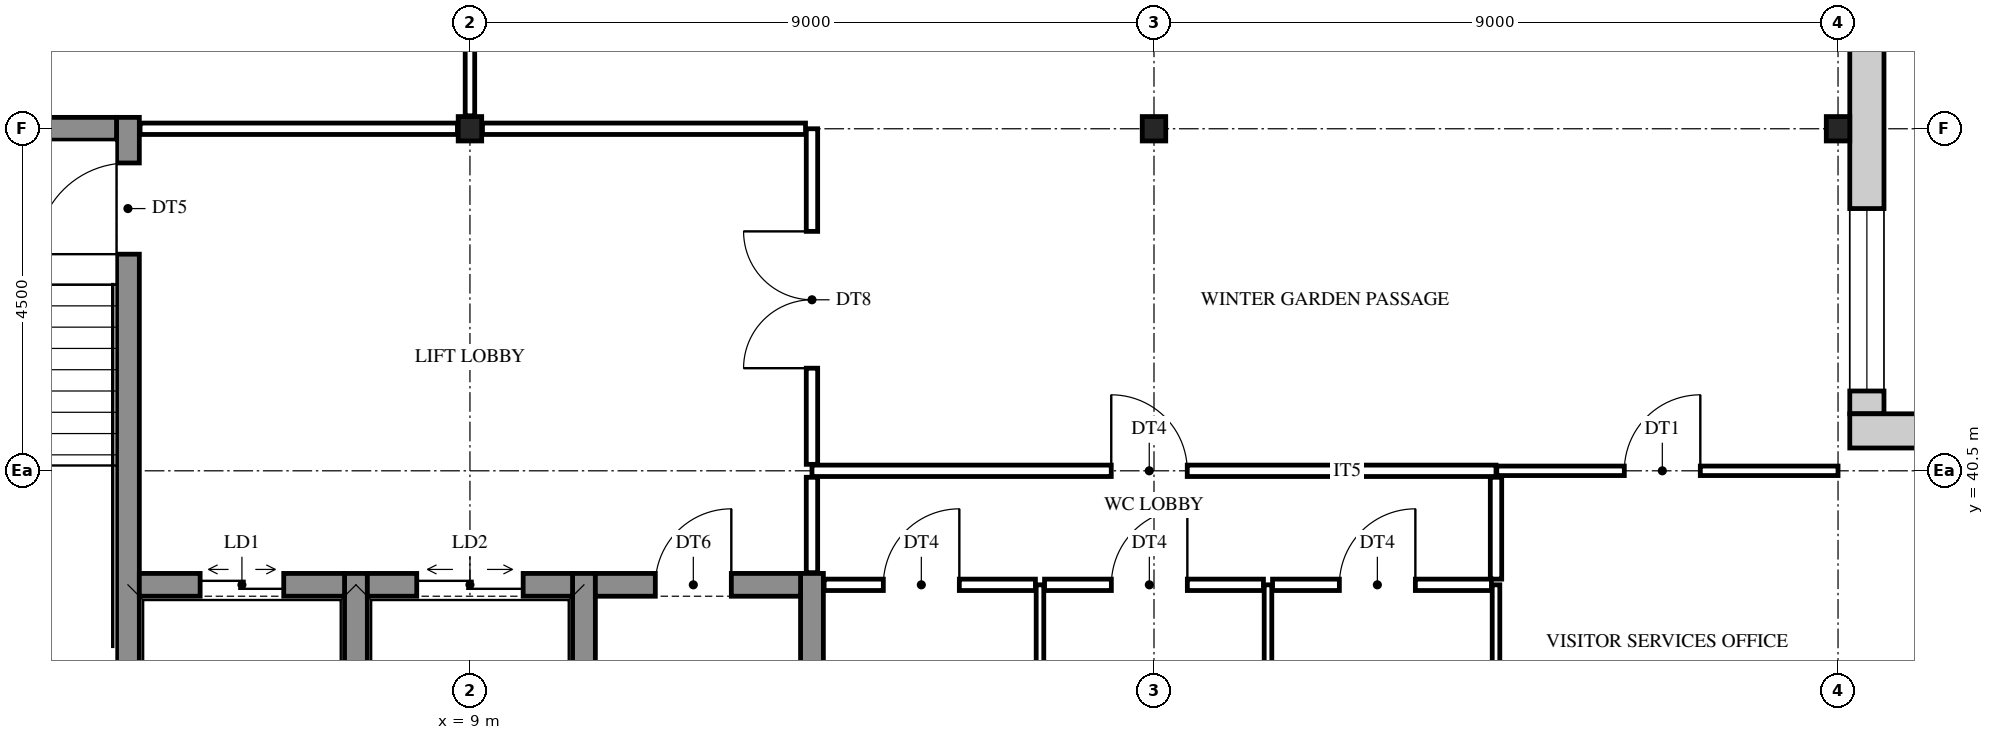
"""IFC4 building model, lengths in metres.
Left out: names, types, materials, properties, quantities, classifications, styles, units other than length and angle.
Written with IfcOpenShell. Run it as: python <this file> out.ifc"""

import sys

from ifc_helpers import new_model, si_unit, direction, frame, frame_2d, origin, origin_2d, place, context, subcontext, project, spatial, rectangle, i_section, extrude, element, fill, save


model = new_model("IFC4")
c1 = context("Model", 3, precision=1e-05, world=origin(), true_north=direction((0.0, 1.0)))
c2 = subcontext(c1, "Body", "Model", "MODEL_VIEW")
j1 = project(units=[si_unit("LENGTHUNIT", "METRE"), si_unit("PLANEANGLEUNIT", "RADIAN")], contexts=[c1])
p1 = place(None, origin())
s1 = spatial("IfcSite", under=j1, at=p1, CompositionType="ELEMENT")
p2 = place(p1, origin())
s2 = spatial("IfcBuilding", under=s1, at=p2, CompositionType="ELEMENT")
p3 = place(p2, origin())
s3 = spatial("IfcBuildingStorey", under=s2, at=p3, CompositionType="ELEMENT", Elevation=0.0)
for number, where, z_axis, x_axis in (
    (1, (9.0, 45.0, 0.0), (0.0, 0.0, 1.0), (1.0, 0.0, 0.0)),
    (2, (18.0, 45.0, 0.0), (0.0, 0.0, 1.0), (1.0, 0.0, 0.0)),
    (3, (27.0, 45.0, 0.0), (0.0, 0.0, 1.0), (1.0, 0.0, 0.0)),
):
    element("IfcColumn", number, at=place(p3, frame(where, z_axis=z_axis, x_axis=x_axis)), inside=s3, PredefinedType="COLUMN", context=c2, shape_type="SweptSolid", body=[
        extrude(i_section(OverallWidth=0.309, OverallDepth=0.321, WebThickness=0.014, FlangeThickness=0.022, FilletRadius=0.017, at=origin_2d()), origin(), (0.0, 0.0, 1.0), 6.0),
    ])
p4 = place(p3, frame((4.5, 35.85, 0.0), z_axis=(0.0, 0.0, 1.0), x_axis=(0.0, 1.0, 0.0)))
e4 = element("IfcWall", 4, at=p4, inside=s3, PredefinedType="SHEAR", context=c2, shape_type="SweptSolid", body=[
    extrude(rectangle(XDim=9.3, YDim=0.3, at=frame_2d((4.65, 0.0))), origin(), (0.0, 0.0, 1.0), 6.0),
])
p5 = place(p4, frame((7.5, 0.0, 0.0)))
e5 = element("IfcOpeningElement", 5, at=p5, cuts=e4, PredefinedType="OPENING", context=c2, shape_type="SweptSolid", body=[
    extrude(rectangle(XDim=1.2, YDim=2.1, at=frame_2d((0.6, 1.05))), frame((0.0, 0.16, 0.0), z_axis=(0.0, -1.0, 0.0), x_axis=(1.0, 0.0, 0.0)), (0.0, 0.0, 1.0), 0.32),
])
for number, where, z_axis, x_axis in (
    (6, (7.5, 35.85, 0.0), (0.0, 0.0, 1.0), (0.0, 1.0, 0.0)),
    (7, (10.5, 35.85, 0.0), (0.0, 0.0, 1.0), (0.0, 1.0, 0.0)),
    (8, (13.5, 35.85, 0.0), (0.0, 0.0, 1.0), (0.0, 1.0, 0.0)),
):
    element("IfcWall", number, at=place(p3, frame(where, z_axis=z_axis, x_axis=x_axis)), inside=s3, PredefinedType="SHEAR", context=c2, shape_type="SweptSolid", body=[
        extrude(rectangle(XDim=3.3, YDim=0.3, at=frame_2d((1.65, 0.0))), origin(), (0.0, 0.0, 1.0), 6.0),
    ])
p6 = place(p3, frame((4.65, 39.0, 0.0), z_axis=(0.0, 0.0, 1.0), x_axis=(1.0, 0.0, 0.0)))
e9 = element("IfcWall", 9, at=p6, inside=s3, PredefinedType="SHEAR", context=c2, shape_type="SweptSolid", body=[
    extrude(rectangle(XDim=2.7, YDim=0.3, at=frame_2d((1.35, 0.0))), origin(), (0.0, 0.0, 1.0), 6.0),
])
p7 = place(p6, frame((0.8, 0.0, 0.0)))
e10 = element("IfcOpeningElement", 10, at=p7, cuts=e9, PredefinedType="OPENING", context=c2, shape_type="SweptSolid", body=[
    extrude(rectangle(XDim=1.1, YDim=2.1, at=frame_2d((0.55, 1.05))), frame((0.0, 0.16, 0.0), z_axis=(0.0, -1.0, 0.0), x_axis=(1.0, 0.0, 0.0)), (0.0, 0.0, 1.0), 0.32),
])
p8 = place(p3, frame((7.65, 39.0, 0.0), z_axis=(0.0, 0.0, 1.0), x_axis=(1.0, 0.0, 0.0)))
e11 = element("IfcWall", 11, at=p8, inside=s3, PredefinedType="SHEAR", context=c2, shape_type="SweptSolid", body=[
    extrude(rectangle(XDim=2.7, YDim=0.3, at=frame_2d((1.35, 0.0))), origin(), (0.0, 0.0, 1.0), 6.0),
])
p9 = place(p8, frame((0.65, 0.0, 0.0)))
e12 = element("IfcOpeningElement", 12, at=p9, cuts=e11, PredefinedType="OPENING", context=c2, shape_type="SweptSolid", body=[
    extrude(rectangle(XDim=1.4, YDim=2.1, at=frame_2d((0.7, 1.05))), frame((0.0, 0.16, 0.0), z_axis=(0.0, -1.0, 0.0), x_axis=(1.0, 0.0, 0.0)), (0.0, 0.0, 1.0), 0.32),
])
p10 = place(p3, frame((10.65, 39.0, 0.0), z_axis=(0.0, 0.0, 1.0), x_axis=(1.0, 0.0, 0.0)))
e13 = element("IfcWall", 13, at=p10, inside=s3, PredefinedType="SHEAR", context=c2, shape_type="SweptSolid", body=[
    extrude(rectangle(XDim=2.7, YDim=0.3, at=frame_2d((1.35, 0.0))), origin(), (0.0, 0.0, 1.0), 6.0),
])
p11 = place(p10, frame((0.789, 0.0, 0.0)))
e14 = element("IfcOpeningElement", 14, at=p11, cuts=e13, PredefinedType="OPENING", context=c2, shape_type="SweptSolid", body=[
    extrude(rectangle(XDim=1.0, YDim=2.1, at=frame_2d((0.5, 1.05))), frame((0.0, 0.16, 0.0), z_axis=(0.0, -1.0, 0.0), x_axis=(1.0, 0.0, 0.0)), (0.0, 0.0, 1.0), 0.32),
])
p12 = place(p3, frame((0.15, 45.0, 0.0), z_axis=(0.0, 0.0, 1.0), x_axis=(1.0, 0.0, 0.0)))
e15 = element("IfcWall", 15, at=p12, inside=s3, PredefinedType="SHEAR", context=c2, shape_type="SweptSolid", body=[
    extrude(rectangle(XDim=4.2, YDim=0.3, at=frame_2d((2.1, 0.0))), origin(), (0.0, 0.0, 1.0), 6.0),
])
p13 = place(p3, frame((27.379, 72.155, 0.0), z_axis=(0.0, 0.0, 1.0), x_axis=(0.0, -1.0, 0.0)))
e16 = element("IfcWall", 16, at=p13, inside=s3, PredefinedType="STANDARD", context=c2, shape_type="SweptSolid", body=[
    extrude(rectangle(XDim=30.905, YDim=0.45, at=frame_2d((15.452, 0.0))), origin(), (0.0, 0.0, 1.0), 6.0),
])
p14 = place(p13, frame((19.054, 0.0, 0.012)))
e17 = element("IfcOpeningElement", 17, at=p14, cuts=e16, PredefinedType="OPENING", context=c2, shape_type="SweptSolid", body=[
    extrude(rectangle(XDim=3.6, YDim=2.7, at=frame_2d((1.8, 1.35))), frame((0.0, 0.235, 0.0), z_axis=(0.0, -1.0, 0.0), x_axis=(1.0, 0.0, 0.0)), (0.0, 0.0, 1.0), 0.47),
])
p15 = place(p13, frame((28.205, 0.0, 0.9)))
e18 = element("IfcOpeningElement", 18, at=p15, cuts=e16, PredefinedType="OPENING", context=c2, shape_type="SweptSolid", body=[
    extrude(rectangle(XDim=2.4, YDim=3.5, at=frame_2d((1.2, 1.75))), frame((0.0, 0.235, 0.0), z_axis=(0.0, -1.0, 0.0), x_axis=(1.0, 0.0, 0.0)), (0.0, 0.0, 1.0), 0.47),
])
p16 = place(p13, frame((23.705, 0.0, 0.9)))
e19 = element("IfcOpeningElement", 19, at=p16, cuts=e16, PredefinedType="OPENING", context=c2, shape_type="SweptSolid", body=[
    extrude(rectangle(XDim=2.4, YDim=3.5, at=frame_2d((1.2, 1.75))), frame((0.0, 0.235, 0.0), z_axis=(0.0, -1.0, 0.0), x_axis=(1.0, 0.0, 0.0)), (0.0, 0.0, 1.0), 0.47),
])
p17 = place(p13, frame((14.705, 0.0, 0.9)))
e20 = element("IfcOpeningElement", 20, at=p17, cuts=e16, PredefinedType="OPENING", context=c2, shape_type="SweptSolid", body=[
    extrude(rectangle(XDim=2.4, YDim=3.5, at=frame_2d((1.2, 1.75))), frame((0.0, 0.235, 0.0), z_axis=(0.0, -1.0, 0.0), x_axis=(1.0, 0.0, 0.0)), (0.0, 0.0, 1.0), 0.47),
])
p18 = place(p13, frame((10.205, 0.0, 0.9)))
e21 = element("IfcOpeningElement", 21, at=p18, cuts=e16, PredefinedType="OPENING", context=c2, shape_type="SweptSolid", body=[
    extrude(rectangle(XDim=2.4, YDim=3.5, at=frame_2d((1.2, 1.75))), frame((0.0, 0.235, 0.0), z_axis=(0.0, -1.0, 0.0), x_axis=(1.0, 0.0, 0.0)), (0.0, 0.0, 1.0), 0.47),
])
p19 = place(p3, frame((27.155, 41.025, 0.0), z_axis=(0.0, 0.0, 1.0), x_axis=(1.0, 0.0, 0.0)))
e22 = element("IfcWall", 22, at=p19, inside=s3, PredefinedType="STANDARD", context=c2, shape_type="SweptSolid", body=[
    extrude(rectangle(XDim=5.095, YDim=0.45, at=frame_2d((2.548, 0.0))), origin(), (0.0, 0.0, 1.0), 6.0),
])
p20 = place(p3, frame((9.0, 45.17, 0.0), z_axis=(0.0, 0.0, 1.0), x_axis=(0.0, 1.0, 0.0)))
e23 = element("IfcWall", 23, at=p20, inside=s3, PredefinedType="PARTITIONING", context=c2, shape_type="SweptSolid", body=[
    extrude(rectangle(XDim=8.659, YDim=0.125, at=frame_2d((4.33, 0.0))), origin(), (0.0, 0.0, 1.0), 5.218),
])
p21 = place(p20, frame((3.429, 0.0, 0.0)))
e24 = element("IfcOpeningElement", 24, at=p21, cuts=e23, PredefinedType="OPENING", context=c2, shape_type="SweptSolid", body=[
    extrude(rectangle(XDim=1.8, YDim=2.1, at=frame_2d((0.9, 1.05))), frame((0.0, 0.073, 0.0), z_axis=(0.0, -1.0, 0.0), x_axis=(1.0, 0.0, 0.0)), (0.0, 0.0, 1.0), 0.145),
])
p22 = place(p3, frame((13.5, 39.16, 0.0), z_axis=(0.0, 0.0, 1.0), x_axis=(0.0, 1.0, 0.0)))
e25 = element("IfcWall", 25, at=p22, inside=s3, PredefinedType="PARTITIONING", context=c2, shape_type="SweptSolid", body=[
    extrude(rectangle(XDim=1.255, YDim=0.15, at=frame_2d((0.627, 0.0))), origin(), (0.0, 0.0, 1.0), 5.218),
])
p23 = place(p3, frame((13.5, 40.585, 0.0), z_axis=(0.0, 0.0, 1.0), x_axis=(0.0, 1.0, 0.0)))
e26 = element("IfcWall", 26, at=p23, inside=s3, PredefinedType="PARTITIONING", context=c2, shape_type="SweptSolid", body=[
    extrude(rectangle(XDim=4.415, YDim=0.15, at=frame_2d((2.208, 0.0))), origin(), (0.0, 0.0, 1.0), 5.218),
])
p24 = place(p23, frame((1.265, 0.0, 0.0)))
e27 = element("IfcOpeningElement", 27, at=p24, cuts=e26, PredefinedType="OPENING", context=c2, shape_type="SweptSolid", body=[
    extrude(rectangle(XDim=1.8, YDim=2.1, at=frame_2d((0.9, 1.05))), frame((0.0, 0.085, 0.0), z_axis=(0.0, -1.0, 0.0), x_axis=(1.0, 0.0, 0.0)), (0.0, 0.0, 1.0), 0.17),
])
for number, where, z_axis, x_axis in (
    (28, (16.5, 35.85, 0.0), (0.0, 0.0, 1.0), (0.0, 1.0, 0.0)),
    (29, (19.5, 35.85, 0.0), (0.0, 0.0, 1.0), (0.0, 1.0, 0.0)),
    (30, (22.5, 35.85, 0.0), (0.0, 0.0, 1.0), (0.0, 1.0, 0.0)),
):
    element("IfcWall", number, at=place(p3, frame(where, z_axis=z_axis, x_axis=x_axis)), inside=s3, PredefinedType="PARTITIONING", context=c2, shape_type="SweptSolid", body=[
        extrude(rectangle(XDim=3.15, YDim=0.1, at=frame_2d((1.575, 0.0))), origin(), (0.0, 0.0, 1.0), 5.218),
    ])
p25 = place(p3, frame((22.5, 39.075, 0.0), z_axis=(0.0, 0.0, 1.0), x_axis=(0.0, 1.0, 0.0)))
e31 = element("IfcWall", 31, at=p25, inside=s3, PredefinedType="PARTITIONING", context=c2, shape_type="SweptSolid", body=[
    extrude(rectangle(XDim=1.34, YDim=0.15, at=frame_2d((0.67, 0.0))), origin(), (0.0, 0.0, 1.0), 5.218),
])
p26 = place(p3, frame((13.66, 39.0, 0.0), z_axis=(0.0, 0.0, 1.0), x_axis=(1.0, 0.0, 0.0)))
e32 = element("IfcWall", 32, at=p26, inside=s3, PredefinedType="PARTITIONING", context=c2, shape_type="SweptSolid", body=[
    extrude(rectangle(XDim=2.78, YDim=0.15, at=frame_2d((1.39, 0.0))), origin(), (0.0, 0.0, 1.0), 5.218),
])
p27 = place(p26, frame((0.779, 0.0, 0.0)))
e33 = element("IfcOpeningElement", 33, at=p27, cuts=e32, PredefinedType="OPENING", context=c2, shape_type="SweptSolid", body=[
    extrude(rectangle(XDim=1.0, YDim=2.1, at=frame_2d((0.5, 1.05))), frame((0.0, 0.085, 0.0), z_axis=(0.0, -1.0, 0.0), x_axis=(1.0, 0.0, 0.0)), (0.0, 0.0, 1.0), 0.17),
])
p28 = place(p3, frame((16.56, 39.0, 0.0), z_axis=(0.0, 0.0, 1.0), x_axis=(1.0, 0.0, 0.0)))
e34 = element("IfcWall", 34, at=p28, inside=s3, PredefinedType="PARTITIONING", context=c2, shape_type="SweptSolid", body=[
    extrude(rectangle(XDim=2.88, YDim=0.15, at=frame_2d((1.44, 0.0))), origin(), (0.0, 0.0, 1.0), 5.218),
])
p29 = place(p28, frame((0.879, 0.0, 0.0)))
e35 = element("IfcOpeningElement", 35, at=p29, cuts=e34, PredefinedType="OPENING", context=c2, shape_type="SweptSolid", body=[
    extrude(rectangle(XDim=1.0, YDim=2.1, at=frame_2d((0.5, 1.05))), frame((0.0, 0.085, 0.0), z_axis=(0.0, -1.0, 0.0), x_axis=(1.0, 0.0, 0.0)), (0.0, 0.0, 1.0), 0.17),
])
p30 = place(p3, frame((19.56, 39.0, 0.0), z_axis=(0.0, 0.0, 1.0), x_axis=(1.0, 0.0, 0.0)))
e36 = element("IfcWall", 36, at=p30, inside=s3, PredefinedType="PARTITIONING", context=c2, shape_type="SweptSolid", body=[
    extrude(rectangle(XDim=2.88, YDim=0.15, at=frame_2d((1.44, 0.0))), origin(), (0.0, 0.0, 1.0), 5.218),
])
p31 = place(p30, frame((0.879, 0.0, 0.0)))
e37 = element("IfcOpeningElement", 37, at=p31, cuts=e36, PredefinedType="OPENING", context=c2, shape_type="SweptSolid", body=[
    extrude(rectangle(XDim=1.0, YDim=2.1, at=frame_2d((0.5, 1.05))), frame((0.0, 0.085, 0.0), z_axis=(0.0, -1.0, 0.0), x_axis=(1.0, 0.0, 0.0)), (0.0, 0.0, 1.0), 0.17),
])
p32 = place(p3, frame((13.5, 40.5, 0.0), z_axis=(0.0, 0.0, 1.0), x_axis=(1.0, 0.0, 0.0)))
e38 = element("IfcWall", 38, at=p32, inside=s3, PredefinedType="PARTITIONING", context=c2, shape_type="SweptSolid", body=[
    extrude(rectangle(XDim=9.0, YDim=0.15, at=frame_2d((4.5, 0.0))), origin(), (0.0, 0.0, 1.0), 5.218),
])
p33 = place(p32, frame((3.938, 0.0, 0.0)))
e39 = element("IfcOpeningElement", 39, at=p33, cuts=e38, PredefinedType="OPENING", context=c2, shape_type="SweptSolid", body=[
    extrude(rectangle(XDim=1.0, YDim=2.1, at=frame_2d((0.5, 1.05))), frame((0.0, 0.085, 0.0), z_axis=(0.0, -1.0, 0.0), x_axis=(1.0, 0.0, 0.0)), (0.0, 0.0, 1.0), 0.17),
])
p34 = place(p3, frame((22.51, 40.5, 0.0), z_axis=(0.0, 0.0, 1.0), x_axis=(1.0, 0.0, 0.0)))
e40 = element("IfcWall", 40, at=p34, inside=s3, PredefinedType="PARTITIONING", context=c2, shape_type="SweptSolid", body=[
    extrude(rectangle(XDim=4.49, YDim=0.125, at=frame_2d((2.245, 0.0))), origin(), (0.0, 0.0, 1.0), 5.218),
])
p35 = place(p34, frame((1.678, 0.0, 0.0)))
e41 = element("IfcOpeningElement", 41, at=p35, cuts=e40, PredefinedType="OPENING", context=c2, shape_type="SweptSolid", body=[
    extrude(rectangle(XDim=1.0, YDim=2.1, at=frame_2d((0.5, 1.05))), frame((0.0, 0.073, 0.0), z_axis=(0.0, -1.0, 0.0), x_axis=(1.0, 0.0, 0.0)), (0.0, 0.0, 1.0), 0.145),
])
p36 = place(p3, frame((4.66, 45.0, 0.0), z_axis=(0.0, 0.0, 1.0), x_axis=(1.0, 0.0, 0.0)))
e42 = element("IfcWall", 42, at=p36, inside=s3, PredefinedType="PARTITIONING", context=c2, shape_type="SweptSolid", body=[
    extrude(rectangle(XDim=4.176, YDim=0.15, at=frame_2d((2.088, 0.0))), origin(), (0.0, 0.0, 1.0), 5.218),
])
p37 = place(p3, frame((9.165, 45.0, 0.0), z_axis=(0.0, 0.0, 1.0), x_axis=(1.0, 0.0, 0.0)))
e43 = element("IfcWall", 43, at=p37, inside=s3, PredefinedType="PARTITIONING", context=c2, shape_type="SweptSolid", body=[
    extrude(rectangle(XDim=4.25, YDim=0.15, at=frame_2d((2.125, 0.0))), origin(), (0.0, 0.0, 1.0), 5.218),
])
p38 = place(p15, origin())
e44 = element("IfcWindow", 44, at=p38, inside=s3, PartitioningType="SINGLE_PANEL", PredefinedType="WINDOW", context=c2, shape_type="SweptSolid", body=[
    extrude(rectangle(XDim=2.4, YDim=3.5, at=frame_2d((1.2, 1.75))), frame((0.0, 0.03, 0.0), z_axis=(0.0, -1.0, 0.0), x_axis=(1.0, 0.0, 0.0)), (0.0, 0.0, 1.0), 0.06),
])
fill(e18, e44)
p39 = place(p5, origin())
e45 = element("IfcDoor", 45, at=p39, inside=s3, OperationType="SINGLE_SWING_LEFT", PredefinedType="DOOR", context=c2, shape_type="SweptSolid", body=[
    extrude(rectangle(XDim=1.2, YDim=2.1, at=frame_2d((0.6, 1.05))), frame((0.0, 0.025, 0.0), z_axis=(0.0, -1.0, 0.0), x_axis=(1.0, 0.0, 0.0)), (0.0, 0.0, 1.0), 0.05),
])
fill(e5, e45)
p40 = place(p11, frame((1.0, 0.0, 0.0), z_axis=(0.0, 0.0, 1.0), x_axis=(-1.0, 0.0, 0.0)))
e46 = element("IfcDoor", 46, at=p40, inside=s3, OperationType="SINGLE_SWING_RIGHT", PredefinedType="DOOR", context=c2, shape_type="SweptSolid", body=[
    extrude(rectangle(XDim=1.0, YDim=2.1, at=frame_2d((0.5, 1.05))), frame((0.0, 0.025, 0.0), z_axis=(0.0, -1.0, 0.0), x_axis=(1.0, 0.0, 0.0)), (0.0, 0.0, 1.0), 0.05),
])
fill(e14, e46)
p41 = place(p24, frame((1.8, 0.0, 0.0), z_axis=(0.0, 0.0, 1.0), x_axis=(-1.0, 0.0, 0.0)))
e47 = element("IfcDoor", 47, at=p41, inside=s3, OperationType="DOUBLE_DOOR_SINGLE_SWING", PredefinedType="DOOR", context=c2, shape_type="SweptSolid", body=[
    extrude(rectangle(XDim=1.8, YDim=2.1, at=frame_2d((0.9, 1.05))), frame((0.0, 0.025, 0.0), z_axis=(0.0, -1.0, 0.0), x_axis=(1.0, 0.0, 0.0)), (0.0, 0.0, 1.0), 0.05),
])
fill(e27, e47)
p42 = place(p27, frame((1.0, 0.0, 0.0), z_axis=(0.0, 0.0, 1.0), x_axis=(-1.0, 0.0, 0.0)))
e48 = element("IfcDoor", 48, at=p42, inside=s3, OperationType="SINGLE_SWING_RIGHT", PredefinedType="DOOR", context=c2, shape_type="SweptSolid", body=[
    extrude(rectangle(XDim=1.0, YDim=2.1, at=frame_2d((0.5, 1.05))), frame((0.0, 0.025, 0.0), z_axis=(0.0, -1.0, 0.0), x_axis=(1.0, 0.0, 0.0)), (0.0, 0.0, 1.0), 0.05),
])
fill(e33, e48)
p43 = place(p29, frame((1.0, 0.0, 0.0), z_axis=(0.0, 0.0, 1.0), x_axis=(-1.0, 0.0, 0.0)))
e49 = element("IfcDoor", 49, at=p43, inside=s3, OperationType="SINGLE_SWING_RIGHT", PredefinedType="DOOR", context=c2, shape_type="SweptSolid", body=[
    extrude(rectangle(XDim=1.0, YDim=2.1, at=frame_2d((0.5, 1.05))), frame((0.0, 0.025, 0.0), z_axis=(0.0, -1.0, 0.0), x_axis=(1.0, 0.0, 0.0)), (0.0, 0.0, 1.0), 0.05),
])
fill(e35, e49)
p44 = place(p31, frame((1.0, 0.0, 0.0), z_axis=(0.0, 0.0, 1.0), x_axis=(-1.0, 0.0, 0.0)))
e50 = element("IfcDoor", 50, at=p44, inside=s3, OperationType="SINGLE_SWING_RIGHT", PredefinedType="DOOR", context=c2, shape_type="SweptSolid", body=[
    extrude(rectangle(XDim=1.0, YDim=2.1, at=frame_2d((0.5, 1.05))), frame((0.0, 0.025, 0.0), z_axis=(0.0, -1.0, 0.0), x_axis=(1.0, 0.0, 0.0)), (0.0, 0.0, 1.0), 0.05),
])
fill(e37, e50)
p45 = place(p33, origin())
e51 = element("IfcDoor", 51, at=p45, inside=s3, OperationType="SINGLE_SWING_LEFT", PredefinedType="DOOR", context=c2, shape_type="SweptSolid", body=[
    extrude(rectangle(XDim=1.0, YDim=2.1, at=frame_2d((0.5, 1.05))), frame((0.0, 0.025, 0.0), z_axis=(0.0, -1.0, 0.0), x_axis=(1.0, 0.0, 0.0)), (0.0, 0.0, 1.0), 0.05),
])
fill(e39, e51)
p46 = place(p35, frame((1.0, 0.0, 0.0), z_axis=(0.0, 0.0, 1.0), x_axis=(-1.0, 0.0, 0.0)))
e52 = element("IfcDoor", 52, at=p46, inside=s3, OperationType="SINGLE_SWING_RIGHT", PredefinedType="DOOR", context=c2, shape_type="SweptSolid", body=[
    extrude(rectangle(XDim=1.0, YDim=2.1, at=frame_2d((0.5, 1.05))), frame((0.0, 0.025, 0.0), z_axis=(0.0, -1.0, 0.0), x_axis=(1.0, 0.0, 0.0)), (0.0, 0.0, 1.0), 0.05),
])
fill(e41, e52)
p47 = place(p7, origin())
e53 = element("IfcDoor", 53, at=p47, inside=s3, OperationType="DOUBLE_DOOR_SLIDING", PredefinedType="DOOR", context=c2, shape_type="SweptSolid", body=[
    extrude(rectangle(XDim=1.1, YDim=2.1, at=frame_2d((0.55, 1.05))), frame((0.0, 0.025, 0.0), z_axis=(0.0, -1.0, 0.0), x_axis=(1.0, 0.0, 0.0)), (0.0, 0.0, 1.0), 0.05),
])
fill(e10, e53)
p48 = place(p9, origin())
e54 = element("IfcDoor", 54, at=p48, inside=s3, OperationType="DOUBLE_DOOR_SLIDING", PredefinedType="DOOR", context=c2, shape_type="SweptSolid", body=[
    extrude(rectangle(XDim=1.4, YDim=2.1, at=frame_2d((0.7, 1.05))), frame((0.0, 0.025, 0.0), z_axis=(0.0, -1.0, 0.0), x_axis=(1.0, 0.0, 0.0)), (0.0, 0.0, 1.0), 0.05),
])
fill(e12, e54)
save(model, sys.argv[1])
